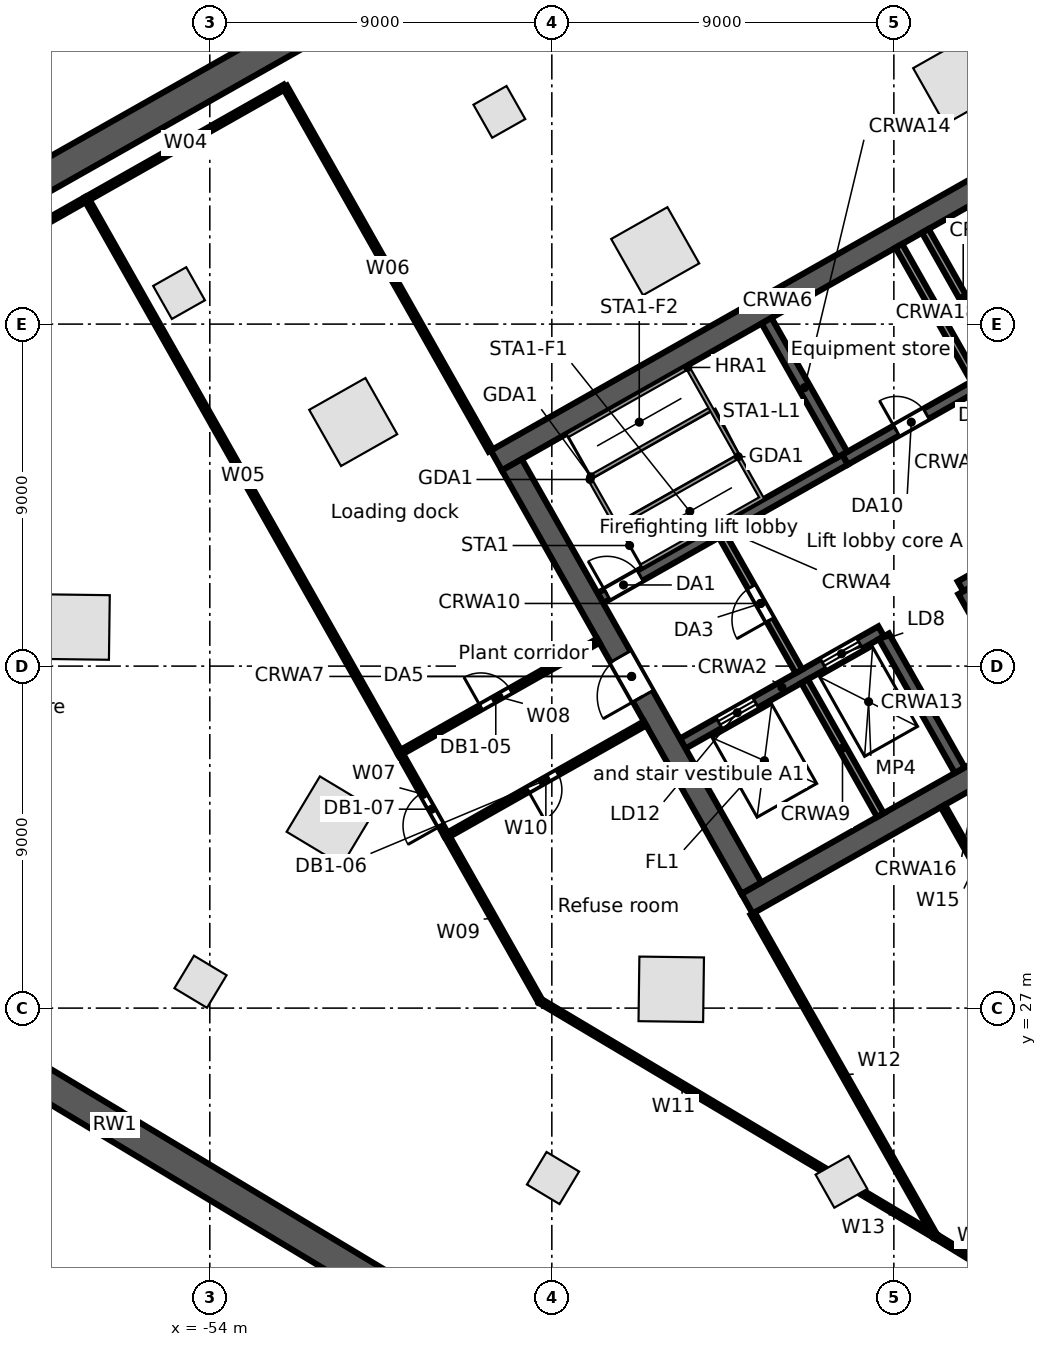
"""IFC4 building model, lengths in metres.
Left out: names, types, materials, properties, quantities, classifications, styles, units other than length and angle.
Written with IfcOpenShell. Run it as: python <this file> out.ifc"""

import sys

from ifc_helpers import new_model, si_unit, direction, frame, frame_2d, origin, origin_2d, place, context, subcontext, project, spatial, rectangle, extrude, element, fill, save


model = new_model("IFC4")
c1 = context("Model", 3, precision=1e-05, world=origin(), true_north=direction((0.0, 1.0)))
c2 = subcontext(c1, "Body", "Model", "MODEL_VIEW")
j1 = project(units=[si_unit("LENGTHUNIT", "METRE"), si_unit("PLANEANGLEUNIT", "RADIAN")], contexts=[c1])
p1 = place(None, origin())
s1 = spatial("IfcSite", under=j1, at=p1, CompositionType="ELEMENT")
p2 = place(p1, origin())
s2 = spatial("IfcBuilding", under=s1, at=p2, CompositionType="ELEMENT")
p3 = place(p2, frame((0.0, 0.0, -4.8)))
s3 = spatial("IfcBuildingStorey", under=s2, at=p3, CompositionType="ELEMENT", Elevation=-4.8)
p4 = place(p3, frame((-5.971, 78.503, 0.0), z_axis=(0.0, 0.0, 1.0), x_axis=(-0.870356741611, -0.492421711882, 0.0)))
e1 = element("IfcWall", 1, at=p4, inside=s3, PredefinedType="SOLIDWALL", context=c2, shape_type="SweptSolid", body=[
    extrude(rectangle(XDim=70.604, YDim=0.8, at=frame_2d((35.302, 0.0))), origin(), (0.0, 0.0, 1.0), 4.8),
])
p5 = place(p3, frame((-66.973, 30.208, 0.0), z_axis=(0.0, 0.0, 1.0), x_axis=(0.85716750858, -0.515037728943, 0.0)))
e2 = element("IfcWall", 2, at=p5, inside=s3, PredefinedType="SOLIDWALL", context=c2, shape_type="SweptSolid", body=[
    extrude(rectangle(XDim=24.44, YDim=0.8, at=frame_2d((12.22, 0.0))), origin(), (0.0, 0.0, 1.0), 4.8),
])
p6 = place(p3, frame((-35.211, 18.197, 0.0), z_axis=(0.0, 0.0, 1.0), x_axis=(0.870356230452, 0.492422615355, 0.0)))
e3 = element("IfcWall", 3, at=p6, inside=s3, PredefinedType="SOLIDWALL", context=c2, shape_type="SweptSolid", body=[
    extrude(rectangle(XDim=41.941, YDim=0.8, at=frame_2d((20.97, 0.0))), origin(), (0.0, 0.0, 1.0), 4.8),
])
for number, where, z_axis, x_axis in (
    (4, (-34.334, 51.414, 0.0), (0.0, 0.0, 1.0), (-0.87, -0.492, 0.0)),
    (5, (-42.28, 46.919, 0.0), (0.0, 0.0, 1.0), (-0.87, -0.492, 0.0)),
    (6, (-50.226, 42.423, 0.0), (0.0, 0.0, 1.0), (-0.87, -0.492, 0.0)),
    (7, (-57.493, 37.027, 0.0), (0.0, 0.0, 1.0), (-0.013, -1.0, 0.0)),
    (8, (-50.812, 31.931, 0.0), (0.0, 0.0, 1.0), (0.857, -0.515, 0.0)),
    (9, (-41.858, 27.495, 0.0), (0.0, 0.0, 1.0), (1.0, -0.013, 0.0)),
):
    element("IfcColumn", number, at=place(p3, frame(where, z_axis=z_axis, x_axis=x_axis)), inside=s3, PredefinedType="COLUMN", context=c2, shape_type="SweptSolid", body=[
        extrude(rectangle(XDim=1.7, YDim=1.7, at=origin_2d()), origin(), (0.0, 0.0, 1.0), 4.8),
    ])
for number, where, z_axis, x_axis in (
    (10, (-46.381, 50.584, 0.0), (0.0, 0.0, 1.0), (-0.87, -0.492, 0.0)),
    (11, (-54.81, 45.816, 0.0), (0.0, 0.0, 1.0), (-0.87, -0.492, 0.0)),
    (12, (-54.245, 27.694, 0.0), (0.0, 0.0, 1.0), (0.857, -0.515, 0.0)),
    (13, (-44.969, 22.528, 0.0), (0.0, 0.0, 1.0), (0.857, -0.515, 0.0)),
    (14, (-37.378, 22.429, 0.0), (0.0, 0.0, 1.0), (0.87, 0.492, 0.0)),
):
    element("IfcColumn", number, at=place(p3, frame(where, z_axis=z_axis, x_axis=x_axis)), inside=s3, PredefinedType="COLUMN", context=c2, shape_type="SweptSolid", body=[
        extrude(rectangle(XDim=1.0, YDim=1.0, at=origin_2d()), origin(), (0.0, 0.0, 1.0), 4.8),
    ])
p7 = place(p3, frame((-39.862, 29.749, 0.0), z_axis=(0.0, 0.0, 1.0), x_axis=(0.870350116061, 0.492433422375, 0.0)))
e15 = element("IfcWall", 15, at=p7, inside=s3, PredefinedType="SOLIDWALL", context=c2, shape_type="SweptSolid", body=[
    extrude(rectangle(XDim=17.0, YDim=0.6, at=frame_2d((8.5, 0.0))), origin(), (0.0, 0.0, 1.0), 4.35),
])
p8 = place(p7, frame((7.2, 0.0, 0.0)))
e16 = element("IfcOpeningElement", 16, at=p8, cuts=e15, PredefinedType="OPENING", context=c2, shape_type="SweptSolid", body=[
    extrude(rectangle(XDim=1.2, YDim=2.1, at=frame_2d((0.6, 1.05))), frame((0.0, 0.31, 0.0), z_axis=(0.0, -1.0, 0.0), x_axis=(1.0, 0.0, 0.0)), (0.0, 0.0, 1.0), 0.62),
])
p9 = place(p3, frame((-41.556, 33.961, 0.0), z_axis=(0.0, 0.0, 1.0), x_axis=(0.870343731308, 0.492444706919, 0.0)))
e17 = element("IfcWall", 17, at=p9, inside=s3, PredefinedType="SOLIDWALL", context=c2, shape_type="SweptSolid", body=[
    extrude(rectangle(XDim=6.0, YDim=0.3, at=frame_2d((3.0, 0.0))), origin(), (0.0, 0.0, 1.0), 4.35),
])
p10 = place(p9, frame((1.1, 0.0, 0.0)))
e18 = element("IfcOpeningElement", 18, at=p10, cuts=e17, PredefinedType="OPENING", context=c2, shape_type="SweptSolid", body=[
    extrude(rectangle(XDim=1.1, YDim=2.1, at=frame_2d((0.55, 1.05))), frame((0.0, 0.16, 0.0), z_axis=(0.0, -1.0, 0.0), x_axis=(1.0, 0.0, 0.0)), (0.0, 0.0, 1.0), 0.32),
])
p11 = place(p9, frame((4.25, 0.0, 0.0)))
e19 = element("IfcOpeningElement", 19, at=p11, cuts=e17, PredefinedType="OPENING", context=c2, shape_type="SweptSolid", body=[
    extrude(rectangle(XDim=1.1, YDim=2.1, at=frame_2d((0.55, 1.05))), frame((0.0, 0.16, 0.0), z_axis=(0.0, -1.0, 0.0), x_axis=(1.0, 0.0, 0.0)), (0.0, 0.0, 1.0), 0.32),
])
p12 = place(p3, frame((-34.245, 38.097, 0.0), z_axis=(0.0, 0.0, 1.0), x_axis=(0.870364910201, 0.492407273597, 0.0)))
e20 = element("IfcWall", 20, at=p12, inside=s3, PredefinedType="SOLIDWALL", context=c2, shape_type="SweptSolid", body=[
    extrude(rectangle(XDim=7.4, YDim=0.3, at=frame_2d((3.7, 0.0))), origin(), (0.0, 0.0, 1.0), 4.35),
])
p13 = place(p12, frame((6.2, 0.0, 0.0)))
e21 = element("IfcOpeningElement", 21, at=p13, cuts=e20, PredefinedType="OPENING", context=c2, shape_type="SweptSolid", body=[
    extrude(rectangle(XDim=1.0, YDim=2.1, at=frame_2d((0.5, 1.05))), frame((0.0, 0.16, 0.0), z_axis=(0.0, -1.0, 0.0), x_axis=(1.0, 0.0, 0.0)), (0.0, 0.0, 1.0), 0.32),
])
p14 = place(p3, frame((-43.723, 37.791, 0.0), z_axis=(0.0, 0.0, 1.0), x_axis=(0.87035077051, 0.49243226567, 0.0)))
e22 = element("IfcWall", 22, at=p14, inside=s3, PredefinedType="SOLIDWALL", context=c2, shape_type="SweptSolid", body=[
    extrude(rectangle(XDim=7.4, YDim=0.3, at=frame_2d((3.7, 0.0))), origin(), (0.0, 0.0, 1.0), 4.35),
])
p15 = place(p14, frame((0.2, 0.0, 0.0)))
e23 = element("IfcOpeningElement", 23, at=p15, cuts=e22, PredefinedType="OPENING", context=c2, shape_type="SweptSolid", body=[
    extrude(rectangle(XDim=1.0, YDim=2.1, at=frame_2d((0.5, 1.05))), frame((0.0, 0.16, 0.0), z_axis=(0.0, -1.0, 0.0), x_axis=(1.0, 0.0, 0.0)), (0.0, 0.0, 1.0), 0.32),
])
p16 = place(p3, frame((-37.282, 41.435, 0.0), z_axis=(0.0, 0.0, 1.0), x_axis=(0.870356516133, 0.492422110414, 0.0)))
e24 = element("IfcWall", 24, at=p16, inside=s3, PredefinedType="SOLIDWALL", context=c2, shape_type="SweptSolid", body=[
    extrude(rectangle(XDim=8.4, YDim=0.3, at=frame_2d((4.2, 0.0))), origin(), (0.0, 0.0, 1.0), 4.35),
])
p17 = place(p16, frame((6.2, 0.0, 0.0)))
e25 = element("IfcOpeningElement", 25, at=p17, cuts=e24, PredefinedType="OPENING", context=c2, shape_type="SweptSolid", body=[
    extrude(rectangle(XDim=1.1, YDim=2.1, at=frame_2d((0.55, 1.05))), frame((0.0, 0.16, 0.0), z_axis=(0.0, -1.0, 0.0), x_axis=(1.0, 0.0, 0.0)), (0.0, 0.0, 1.0), 0.32),
])
p18 = place(p16, frame((1.55, 0.0, 0.0)))
e26 = element("IfcOpeningElement", 26, at=p18, cuts=e24, PredefinedType="OPENING", context=c2, shape_type="SweptSolid", body=[
    extrude(rectangle(XDim=0.9, YDim=2.1, at=frame_2d((0.45, 1.05))), frame((0.0, 0.16, 0.0), z_axis=(0.0, -1.0, 0.0), x_axis=(1.0, 0.0, 0.0)), (0.0, 0.0, 1.0), 0.32),
])
p19 = place(p3, frame((-46.461, 41.412, 0.0), z_axis=(0.0, 0.0, 1.0), x_axis=(0.870350116061, 0.492433422375, 0.0)))
e27 = element("IfcWall", 27, at=p19, inside=s3, PredefinedType="SOLIDWALL", context=c2, shape_type="SweptSolid", body=[
    extrude(rectangle(XDim=17.0, YDim=0.6, at=frame_2d((8.5, 0.0))), origin(), (0.0, 0.0, 1.0), 4.35),
])
p20 = place(p3, frame((-46.052, 41.298, 0.0), z_axis=(0.0, 0.0, 1.0), x_axis=(0.492418598281, -0.870358503186, 0.0)))
e28 = element("IfcWall", 28, at=p20, inside=s3, PredefinedType="SOLIDWALL", context=c2, shape_type="SweptSolid", body=[
    extrude(rectangle(XDim=12.8, YDim=0.6, at=frame_2d((6.4, 0.0))), origin(), (0.0, 0.0, 1.0), 4.35),
])
p21 = place(p20, frame((5.8, 0.0, 0.0)))
e29 = element("IfcOpeningElement", 29, at=p21, cuts=e28, PredefinedType="OPENING", context=c2, shape_type="SweptSolid", body=[
    extrude(rectangle(XDim=1.2, YDim=2.1, at=frame_2d((0.6, 1.05))), frame((0.0, 0.31, 0.0), z_axis=(0.0, -1.0, 0.0), x_axis=(1.0, 0.0, 0.0)), (0.0, 0.0, 1.0), 0.62),
])
p22 = place(p3, frame((-38.349, 35.603, 0.0), z_axis=(0.0, 0.0, 1.0), x_axis=(0.49241474071, -0.870360685654, 0.0)))
e30 = element("IfcWall", 30, at=p22, inside=s3, PredefinedType="SOLIDWALL", context=c2, shape_type="SweptSolid", body=[
    extrude(rectangle(XDim=4.05, YDim=0.2, at=frame_2d((2.025, 0.0))), origin(), (0.0, 0.0, 1.0), 4.35),
])
p23 = place(p3, frame((-40.516, 39.433, 0.0), z_axis=(0.0, 0.0, 1.0), x_axis=(0.492453559952, -0.87033872216, 0.0)))
e31 = element("IfcWall", 31, at=p23, inside=s3, PredefinedType="PARTITIONING", context=c2, shape_type="SweptSolid", body=[
    extrude(rectangle(XDim=4.1, YDim=0.2, at=frame_2d((2.05, 0.0))), origin(), (0.0, 0.0, 1.0), 4.35),
])
p24 = place(p23, frame((1.55, 0.0, 0.0)))
e32 = element("IfcOpeningElement", 32, at=p24, cuts=e31, PredefinedType="OPENING", context=c2, shape_type="SweptSolid", body=[
    extrude(rectangle(XDim=1.0, YDim=2.1, at=frame_2d((0.5, 1.05))), frame((0.0, 0.11, 0.0), z_axis=(0.0, -1.0, 0.0), x_axis=(1.0, 0.0, 0.0)), (0.0, 0.0, 1.0), 0.22),
])
p25 = place(p3, frame((-36.26, 36.785, 0.0), z_axis=(0.0, 0.0, 1.0), x_axis=(0.492440575896, -0.870346068648, 0.0)))
e33 = element("IfcWall", 33, at=p25, inside=s3, PredefinedType="SOLIDWALL", context=c2, shape_type="SweptSolid", body=[
    extrude(rectangle(XDim=4.05, YDim=0.3, at=frame_2d((2.025, 0.0))), origin(), (0.0, 0.0, 1.0), 4.35),
])
p26 = place(p3, frame((-39.35, 45.09, 0.0), z_axis=(0.0, 0.0, 1.0), x_axis=(0.49241474071, -0.870360685654, 0.0)))
e34 = element("IfcWall", 34, at=p26, inside=s3, PredefinedType="SOLIDWALL", context=c2, shape_type="SweptSolid", body=[
    extrude(rectangle(XDim=4.05, YDim=0.3, at=frame_2d((2.025, 0.0))), origin(), (0.0, 0.0, 1.0), 4.35),
])
p27 = place(p3, frame((-34.171, 37.967, 0.0), z_axis=(0.0, 0.0, 1.0), x_axis=(0.492394910396, -0.870371904542, 0.0)))
e35 = element("IfcWall", 35, at=p27, inside=s3, PredefinedType="SOLIDWALL", context=c2, shape_type="SweptSolid", body=[
    extrude(rectangle(XDim=4.05, YDim=0.3, at=frame_2d((2.025, 0.0))), origin(), (0.0, 0.0, 1.0), 4.35),
])
p28 = place(p3, frame((-35.869, 47.06, 0.0), z_axis=(0.0, 0.0, 1.0), x_axis=(0.49241474071, -0.870360685654, 0.0)))
e36 = element("IfcWall", 36, at=p28, inside=s3, PredefinedType="SOLIDWALL", context=c2, shape_type="SweptSolid", body=[
    extrude(rectangle(XDim=4.05, YDim=0.2, at=frame_2d((2.025, 0.0))), origin(), (0.0, 0.0, 1.0), 4.35),
])
p29 = place(p3, frame((-35.173, 47.454, 0.0), z_axis=(0.0, 0.0, 1.0), x_axis=(0.492440575896, -0.870346068648, 0.0)))
e37 = element("IfcWall", 37, at=p29, inside=s3, PredefinedType="SOLIDWALL", context=c2, shape_type="SweptSolid", body=[
    extrude(rectangle(XDim=4.05, YDim=0.2, at=frame_2d((2.025, 0.0))), origin(), (0.0, 0.0, 1.0), 4.35),
])
p30 = place(p3, frame((-66.168, 43.245, 0.0), z_axis=(0.0, 0.0, 1.0), x_axis=(0.870369347859, 0.492399429637, 0.0)))
e38 = element("IfcWall", 38, at=p30, inside=s3, PredefinedType="PARTITIONING", context=c2, shape_type="SweptSolid", body=[
    extrude(rectangle(XDim=10.25, YDim=0.125, at=frame_2d((5.125, 0.0))), origin(), (0.0, 0.0, 1.0), 4.35),
])
p31 = place(p3, frame((-57.247, 48.292, 0.0), z_axis=(0.0, 0.0, 1.0), x_axis=(0.870318719588, 0.492488909859, 0.0)))
e39 = element("IfcWall", 39, at=p31, inside=s3, PredefinedType="PARTITIONING", context=c2, shape_type="SweptSolid", body=[
    extrude(rectangle(XDim=6.0, YDim=0.125, at=frame_2d((3.0, 0.0))), origin(), (0.0, 0.0, 1.0), 4.35),
])
p32 = place(p3, frame((-57.247, 48.292, 0.0), z_axis=(0.0, 0.0, 1.0), x_axis=(0.492436165614, -0.870348563965, 0.0)))
e40 = element("IfcWall", 40, at=p32, inside=s3, PredefinedType="PARTITIONING", context=c2, shape_type="SweptSolid", body=[
    extrude(rectangle(XDim=16.75, YDim=0.125, at=frame_2d((8.375, 0.0))), origin(), (0.0, 0.0, 1.0), 3.412),
])
p33 = place(p3, frame((-52.025, 51.247, 0.0), z_axis=(0.0, 0.0, 1.0), x_axis=(0.492376827062, -0.870382134567, 0.0)))
e41 = element("IfcWall", 41, at=p33, inside=s3, PredefinedType="PARTITIONING", context=c2, shape_type="SweptSolid", body=[
    extrude(rectangle(XDim=11.0, YDim=0.125, at=frame_2d((5.5, 0.0))), origin(), (0.0, 0.0, 1.0), 3.63),
])
p34 = place(p3, frame((-48.999, 33.714, 0.0), z_axis=(0.0, 0.0, 1.0), x_axis=(0.492369352746, -0.870386362759, 0.0)))
e42 = element("IfcWall", 42, at=p34, inside=s3, PredefinedType="PARTITIONING", context=c2, shape_type="SweptSolid", body=[
    extrude(rectangle(XDim=2.5, YDim=0.125, at=frame_2d((1.25, 0.0))), origin(), (0.0, 0.0, 1.0), 3.622),
])
p35 = place(p34, frame((1.2, 0.0, 0.0)))
e43 = element("IfcOpeningElement", 43, at=p35, cuts=e42, PredefinedType="OPENING", context=c2, shape_type="SweptSolid", body=[
    extrude(rectangle(XDim=1.0, YDim=2.1, at=frame_2d((0.5, 1.05))), frame((0.0, 0.073, 0.0), z_axis=(0.0, -1.0, 0.0), x_axis=(1.0, 0.0, 0.0)), (0.0, 0.0, 1.0), 0.145),
])
p36 = place(p3, frame((-48.999, 33.714, 0.0), z_axis=(0.0, 0.0, 1.0), x_axis=(0.870396049796, 0.492352228084, 0.0)))
e44 = element("IfcWall", 44, at=p36, inside=s3, PredefinedType="PARTITIONING", context=c2, shape_type="SweptSolid", body=[
    extrude(rectangle(XDim=6.0, YDim=0.125, at=frame_2d((3.0, 0.0))), origin(), (0.0, 0.0, 1.0), 4.35),
])
p37 = place(p36, frame((2.45, 0.0, 0.0)))
e45 = element("IfcOpeningElement", 45, at=p37, cuts=e44, PredefinedType="OPENING", context=c2, shape_type="SweptSolid", body=[
    extrude(rectangle(XDim=0.9, YDim=2.1, at=frame_2d((0.45, 1.05))), frame((0.0, 0.073, 0.0), z_axis=(0.0, -1.0, 0.0), x_axis=(1.0, 0.0, 0.0)), (0.0, 0.0, 1.0), 0.145),
])
p38 = place(p3, frame((-47.768, 31.538, 0.0), z_axis=(0.0, 0.0, 1.0), x_axis=(0.492406341242, -0.870365437678, 0.0)))
e46 = element("IfcWall", 46, at=p38, inside=s3, PredefinedType="PARTITIONING", context=c2, shape_type="SweptSolid", body=[
    extrude(rectangle(XDim=5.0, YDim=0.125, at=frame_2d((2.5, 0.0))), origin(), (0.0, 0.0, 1.0), 3.63),
])
p39 = place(p3, frame((-47.768, 31.538, 0.0), z_axis=(0.0, 0.0, 1.0), x_axis=(0.870405913844, 0.492334789696, 0.0)))
e47 = element("IfcWall", 47, at=p39, inside=s3, PredefinedType="PARTITIONING", context=c2, shape_type="SweptSolid", body=[
    extrude(rectangle(XDim=6.0, YDim=0.125, at=frame_2d((3.0, 0.0))), origin(), (0.0, 0.0, 1.0), 4.35),
])
p40 = place(p39, frame((2.45, 0.0, 0.0)))
e48 = element("IfcOpeningElement", 48, at=p40, cuts=e47, PredefinedType="OPENING", context=c2, shape_type="SweptSolid", body=[
    extrude(rectangle(XDim=0.9, YDim=2.1, at=frame_2d((0.45, 1.05))), frame((0.0, 0.073, 0.0), z_axis=(0.0, -1.0, 0.0), x_axis=(1.0, 0.0, 0.0)), (0.0, 0.0, 1.0), 0.145),
])
p41 = place(p3, frame((-45.306, 27.186, 0.0), z_axis=(0.0, 0.0, 1.0), x_axis=(0.859364033829, -0.511364309824, 0.0)))
e49 = element("IfcWall", 49, at=p41, inside=s3, PredefinedType="PARTITIONING", context=c2, shape_type="SweptSolid", body=[
    extrude(rectangle(XDim=8.689, YDim=0.125, at=frame_2d((4.344, 0.0))), origin(), (0.0, 0.0, 1.0), 3.63),
])
p42 = place(p3, frame((-39.715, 29.488, 0.0), z_axis=(0.0, 0.0, 1.0), x_axis=(0.492486226821, -0.870320237839, 0.0)))
e50 = element("IfcWall", 50, at=p42, inside=s3, PredefinedType="PARTITIONING", context=c2, shape_type="SweptSolid", body=[
    extrude(rectangle(XDim=9.75, YDim=0.125, at=frame_2d((4.875, 0.0))), origin(), (0.0, 0.0, 1.0), 3.522),
])
p43 = place(p3, frame((-36.849, 22.154, 0.0), z_axis=(0.0, 0.0, 1.0), x_axis=(0.859351847871, -0.511384788159, 0.0)))
e51 = element("IfcWall", 51, at=p43, inside=s3, PredefinedType="PARTITIONING", context=c2, shape_type="SweptSolid", body=[
    extrude(rectangle(XDim=2.253, YDim=0.125, at=frame_2d((1.126, 0.0))), origin(), (0.0, 0.0, 1.0), 4.35),
])
p44 = place(p3, frame((-34.913, 21.002, 0.0), z_axis=(0.0, 0.0, 1.0), x_axis=(0.853754667267, -0.520675492145, 0.0)))
e52 = element("IfcWall", 52, at=p44, inside=s3, PredefinedType="PARTITIONING", context=c2, shape_type="SweptSolid", body=[
    extrude(rectangle(XDim=2.168, YDim=0.125, at=frame_2d((1.084, 0.0))), origin(), (0.0, 0.0, 1.0), 4.35),
])
p45 = place(p3, frame((-34.71, 32.319, 0.0), z_axis=(0.0, 0.0, 1.0), x_axis=(0.492310098002, -0.870419879946, 0.0)))
e53 = element("IfcWall", 53, at=p45, inside=s3, PredefinedType="PARTITIONING", context=c2, shape_type="SweptSolid", body=[
    extrude(rectangle(XDim=3.5, YDim=0.125, at=frame_2d((1.75, 0.0))), origin(), (0.0, 0.0, 1.0), 3.522),
])
p46 = place(p10, origin())
e54 = element("IfcDoor", 54, at=p46, inside=s3, OperationType="DOUBLE_DOOR_SLIDING", PredefinedType="DOOR", context=c2, shape_type="SweptSolid", body=[
    extrude(rectangle(XDim=1.1, YDim=2.1, at=frame_2d((0.55, 1.05))), frame((0.0, 0.025, 0.0), z_axis=(0.0, -1.0, 0.0), x_axis=(1.0, 0.0, 0.0)), (0.0, 0.0, 1.0), 0.05),
])
fill(e18, e54)
p47 = place(p11, origin())
e55 = element("IfcDoor", 55, at=p47, inside=s3, OperationType="DOUBLE_DOOR_SLIDING", PredefinedType="DOOR", context=c2, shape_type="SweptSolid", body=[
    extrude(rectangle(XDim=1.1, YDim=2.1, at=frame_2d((0.55, 1.05))), frame((0.0, 0.025, 0.0), z_axis=(0.0, -1.0, 0.0), x_axis=(1.0, 0.0, 0.0)), (0.0, 0.0, 1.0), 0.05),
])
fill(e19, e55)
p48 = place(p15, origin())
e56 = element("IfcDoor", 56, at=p48, inside=s3, OperationType="SINGLE_SWING_LEFT", PredefinedType="DOOR", context=c2, shape_type="SweptSolid", body=[
    extrude(rectangle(XDim=1.0, YDim=2.1, at=frame_2d((0.5, 1.05))), frame((0.0, 0.025, 0.0), z_axis=(0.0, -1.0, 0.0), x_axis=(1.0, 0.0, 0.0)), (0.0, 0.0, 1.0), 0.05),
])
fill(e23, e56)
p49 = place(p24, frame((1.0, 0.0, 0.0), z_axis=(0.0, 0.0, 1.0), x_axis=(-1.0, 0.0, 0.0)))
e57 = element("IfcDoor", 57, at=p49, inside=s3, OperationType="SINGLE_SWING_LEFT", PredefinedType="DOOR", context=c2, shape_type="SweptSolid", body=[
    extrude(rectangle(XDim=1.0, YDim=2.1, at=frame_2d((0.5, 1.05))), frame((0.0, 0.025, 0.0), z_axis=(0.0, -1.0, 0.0), x_axis=(1.0, 0.0, 0.0)), (0.0, 0.0, 1.0), 0.05),
])
fill(e32, e57)
p50 = place(p21, frame((1.2, 0.0, 0.0), z_axis=(0.0, 0.0, 1.0), x_axis=(-1.0, 0.0, 0.0)))
e58 = element("IfcDoor", 58, at=p50, inside=s3, OperationType="SINGLE_SWING_LEFT", PredefinedType="DOOR", context=c2, shape_type="SweptSolid", body=[
    extrude(rectangle(XDim=1.2, YDim=2.1, at=frame_2d((0.6, 1.05))), frame((0.0, 0.025, 0.0), z_axis=(0.0, -1.0, 0.0), x_axis=(1.0, 0.0, 0.0)), (0.0, 0.0, 1.0), 0.05),
])
fill(e29, e58)
p51 = place(p18, origin())
e59 = element("IfcDoor", 59, at=p51, inside=s3, OperationType="SINGLE_SWING_LEFT", PredefinedType="DOOR", context=c2, shape_type="SweptSolid", body=[
    extrude(rectangle(XDim=0.9, YDim=2.1, at=frame_2d((0.45, 1.05))), frame((0.0, 0.025, 0.0), z_axis=(0.0, -1.0, 0.0), x_axis=(1.0, 0.0, 0.0)), (0.0, 0.0, 1.0), 0.05),
])
fill(e26, e59)
p52 = place(p37, origin())
e60 = element("IfcDoor", 60, at=p52, inside=s3, OperationType="SINGLE_SWING_LEFT", PredefinedType="DOOR", context=c2, shape_type="SweptSolid", body=[
    extrude(rectangle(XDim=0.9, YDim=2.1, at=frame_2d((0.45, 1.05))), frame((0.0, 0.025, 0.0), z_axis=(0.0, -1.0, 0.0), x_axis=(1.0, 0.0, 0.0)), (0.0, 0.0, 1.0), 0.05),
])
fill(e45, e60)
p53 = place(p40, frame((0.9, 0.0, 0.0), z_axis=(0.0, 0.0, 1.0), x_axis=(-1.0, 0.0, 0.0)))
e61 = element("IfcDoor", 61, at=p53, inside=s3, OperationType="SINGLE_SWING_RIGHT", PredefinedType="DOOR", context=c2, shape_type="SweptSolid", body=[
    extrude(rectangle(XDim=0.9, YDim=2.1, at=frame_2d((0.45, 1.05))), frame((0.0, 0.025, 0.0), z_axis=(0.0, -1.0, 0.0), x_axis=(1.0, 0.0, 0.0)), (0.0, 0.0, 1.0), 0.05),
])
fill(e48, e61)
p54 = place(p35, frame((1.0, 0.0, 0.0), z_axis=(0.0, 0.0, 1.0), x_axis=(-1.0, 0.0, 0.0)))
e62 = element("IfcDoor", 62, at=p54, inside=s3, OperationType="SINGLE_SWING_LEFT", PredefinedType="DOOR", context=c2, shape_type="SweptSolid", body=[
    extrude(rectangle(XDim=1.0, YDim=2.1, at=frame_2d((0.5, 1.05))), frame((0.0, 0.025, 0.0), z_axis=(0.0, -1.0, 0.0), x_axis=(1.0, 0.0, 0.0)), (0.0, 0.0, 1.0), 0.05),
])
fill(e43, e62)
save(model, sys.argv[1])
